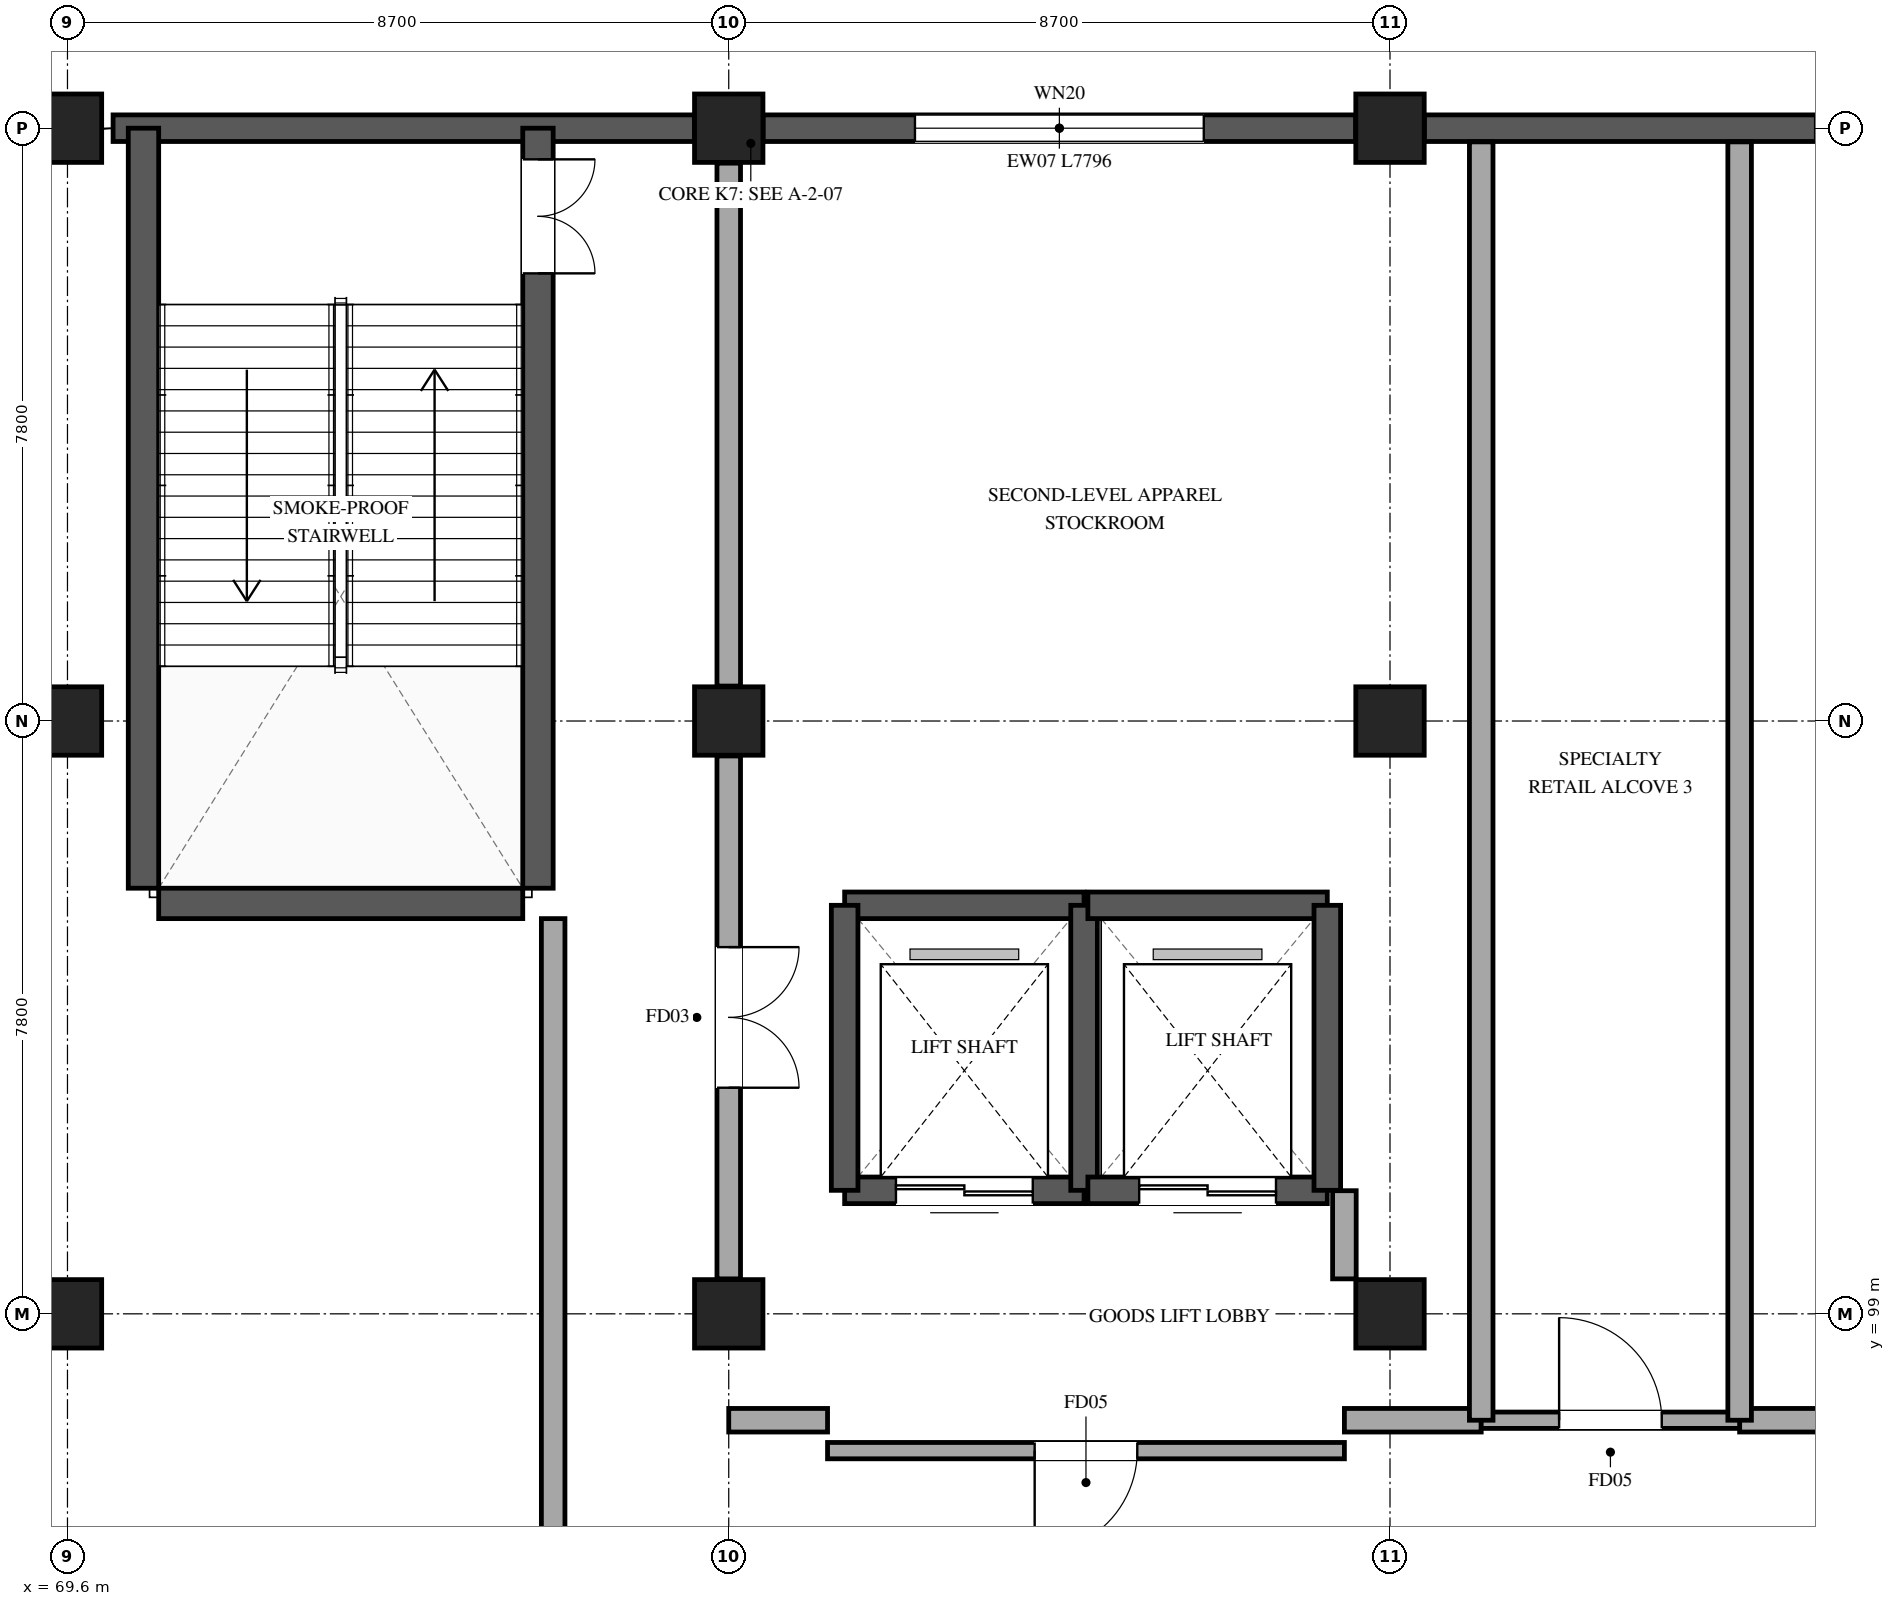
"""IFC4 building model, lengths in metres.
Left out: names, types, materials, properties, quantities, classifications, styles, units other than length and angle.
Written with IfcOpenShell. Run it as: python <this file> out.ifc"""

import sys

from ifc_helpers import new_model, si_unit, direction, frame, frame_2d, origin, origin_2d, place, context, subcontext, project, spatial, rectangle, extrude, element, fill, save


model = new_model("IFC4")
c1 = context("Model", 3, precision=1e-05, world=origin(), true_north=direction((0.0, 1.0)))
c2 = subcontext(c1, "Body", "Model", "MODEL_VIEW")
j1 = project(units=[si_unit("LENGTHUNIT", "METRE"), si_unit("PLANEANGLEUNIT", "RADIAN")], contexts=[c1])
p1 = place(None, origin())
s1 = spatial("IfcSite", under=j1, at=p1, CompositionType="ELEMENT")
p2 = place(p1, origin())
s2 = spatial("IfcBuilding", under=s1, at=p2, CompositionType="ELEMENT")
p3 = place(p2, frame((0.0, 0.0, 6.0)))
s3 = spatial("IfcBuildingStorey", under=s2, at=p3, CompositionType="ELEMENT", Elevation=6.0)
for number, where, z_axis, x_axis in (
    (1, (69.6, 99.0, 0.0), (0.0, 0.0, 1.0), (1.0, 0.0, 0.0)),
    (2, (69.6, 106.8, 0.0), (0.0, 0.0, 1.0), (1.0, 0.0, 0.0)),
    (3, (69.6, 114.6, 0.0), (0.0, 0.0, 1.0), (1.0, 0.0, 0.0)),
    (4, (78.3, 99.0, 0.0), (0.0, 0.0, 1.0), (1.0, 0.0, 0.0)),
    (5, (78.3, 106.8, 0.0), (0.0, 0.0, 1.0), (1.0, 0.0, 0.0)),
    (6, (78.3, 114.6, 0.0), (0.0, 0.0, 1.0), (1.0, 0.0, 0.0)),
    (7, (87.0, 99.0, 0.0), (0.0, 0.0, 1.0), (1.0, 0.0, 0.0)),
    (8, (87.0, 106.8, 0.0), (0.0, 0.0, 1.0), (1.0, 0.0, 0.0)),
    (9, (87.0, 114.6, 0.0), (0.0, 0.0, 1.0), (1.0, 0.0, 0.0)),
):
    element("IfcColumn", number, at=place(p3, frame(where, z_axis=z_axis, x_axis=x_axis)), inside=s3, PredefinedType="COLUMN", context=c2, shape_type="SweptSolid", body=[
        extrude(rectangle(XDim=0.9, YDim=0.9, at=origin_2d()), origin(), (0.0, 0.0, 1.0), 5.4),
    ])
p4 = place(p3, frame((70.2, 114.6, 0.0), z_axis=(0.0, 0.0, 1.0), x_axis=(1.0, 0.0, 0.0)))
e10 = element("IfcWall", 10, at=p4, inside=s3, PredefinedType="STANDARD", context=c2, shape_type="SweptSolid", body=[
    extrude(rectangle(XDim=7.648, YDim=0.35, at=frame_2d((3.824, 0.0))), origin(), (0.0, 0.0, 1.0), 5.09),
])
p5 = place(p3, frame((78.752, 114.6, 0.0), z_axis=(0.0, 0.0, 1.0), x_axis=(1.0, 0.0, 0.0)))
e11 = element("IfcWall", 11, at=p5, inside=s3, PredefinedType="STANDARD", context=c2, shape_type="SweptSolid", body=[
    extrude(rectangle(XDim=7.796, YDim=0.35, at=frame_2d((3.898, 0.0))), origin(), (0.0, 0.0, 1.0), 5.09),
])
p6 = place(p5, frame((1.998, 0.0, 0.85)))
e12 = element("IfcOpeningElement", 12, at=p6, cuts=e11, PredefinedType="OPENING", context=c2, shape_type="SweptSolid", body=[
    extrude(rectangle(XDim=3.8, YDim=2.5, at=frame_2d((1.9, 1.25))), frame((0.0, 0.185, 0.0), z_axis=(0.0, -1.0, 0.0), x_axis=(1.0, 0.0, 0.0)), (0.0, 0.0, 1.0), 0.37),
])
p7 = place(p3, frame((87.452, 114.6, 0.0), z_axis=(0.0, 0.0, 1.0), x_axis=(1.0, 0.0, 0.0)))
e13 = element("IfcWall", 13, at=p7, inside=s3, PredefinedType="STANDARD", context=c2, shape_type="SweptSolid", body=[
    extrude(rectangle(XDim=7.796, YDim=0.35, at=frame_2d((3.898, 0.0))), origin(), (0.0, 0.0, 1.0), 5.09),
])
p8 = place(p7, frame((5.141, 0.0, 0.85)))
e14 = element("IfcOpeningElement", 14, at=p8, cuts=e13, PredefinedType="OPENING", context=c2, shape_type="SweptSolid", body=[
    extrude(rectangle(XDim=2.0, YDim=1.85, at=frame_2d((1.0, 0.925))), frame((0.0, 0.185, 0.0), z_axis=(0.0, -1.0, 0.0), x_axis=(1.0, 0.0, 0.0)), (0.0, 0.0, 1.0), 0.37),
])
p9 = place(p3, frame((70.6, 104.6, 0.0), z_axis=(0.0, 0.0, 1.0), x_axis=(0.0, 1.0, 0.0)))
e15 = element("IfcWall", 15, at=p9, inside=s3, PredefinedType="SHEAR", context=c2, shape_type="SweptSolid", body=[
    extrude(rectangle(XDim=10.0, YDim=0.4, at=frame_2d((5.0, 0.0))), origin(), (0.0, 0.0, 1.0), 5.4),
])
p10 = place(p3, frame((75.79, 114.6, 0.0), z_axis=(0.0, 0.0, 1.0), x_axis=(0.0, -1.0, 0.0)))
e16 = element("IfcWall", 16, at=p10, inside=s3, PredefinedType="SHEAR", context=c2, shape_type="SweptSolid", body=[
    extrude(rectangle(XDim=10.0, YDim=0.4, at=frame_2d((5.0, 0.0))), origin(), (0.0, 0.0, 1.0), 5.4),
])
p11 = place(p10, frame((0.41, 0.0, 0.0)))
e17 = element("IfcOpeningElement", 17, at=p11, cuts=e16, PredefinedType="OPENING", context=c2, shape_type="SweptSolid", body=[
    extrude(rectangle(XDim=1.5, YDim=2.2, at=frame_2d((0.75, 1.1))), frame((0.0, 0.21, 0.0), z_axis=(0.0, -1.0, 0.0), x_axis=(1.0, 0.0, 0.0)), (0.0, 0.0, 1.0), 0.42),
])
p12 = place(p3, frame((75.59, 104.4, 0.0), z_axis=(0.0, 0.0, 1.0), x_axis=(-1.0, 0.0, 0.0)))
e18 = element("IfcWall", 18, at=p12, inside=s3, PredefinedType="SHEAR", context=c2, shape_type="SweptSolid", body=[
    extrude(rectangle(XDim=4.79, YDim=0.4, at=frame_2d((2.395, 0.0))), origin(), (0.0, 0.0, 1.0), 5.4),
])
p13 = place(p3, frame((79.825, 104.375, 0.0), z_axis=(0.0, 0.0, 1.0), x_axis=(1.0, 0.0, 0.0)))
e19 = element("IfcWall", 19, at=p13, inside=s3, PredefinedType="SHEAR", context=c2, shape_type="SweptSolid", body=[
    extrude(rectangle(XDim=3.15, YDim=0.35, at=frame_2d((1.575, 0.0))), origin(), (0.0, 0.0, 1.0), 5.4),
])
p14 = place(p3, frame((82.975, 100.625, 0.0), z_axis=(0.0, 0.0, 1.0), x_axis=(-1.0, 0.0, 0.0)))
e20 = element("IfcWall", 20, at=p14, inside=s3, PredefinedType="SHEAR", context=c2, shape_type="SweptSolid", body=[
    extrude(rectangle(XDim=3.15, YDim=0.35, at=frame_2d((1.575, 0.0))), origin(), (0.0, 0.0, 1.0), 5.4),
])
p15 = place(p14, frame((0.675, 0.0, 0.0)))
e21 = element("IfcOpeningElement", 21, at=p15, cuts=e20, PredefinedType="OPENING", context=c2, shape_type="SweptSolid", body=[
    extrude(rectangle(XDim=1.8, YDim=2.4, at=frame_2d((0.9, 1.2))), frame((0.0, 0.185, 0.0), z_axis=(0.0, -1.0, 0.0), x_axis=(1.0, 0.0, 0.0)), (0.0, 0.0, 1.0), 0.37),
])
for number, where, z_axis, x_axis in (
    (22, (79.825, 100.625, 0.0), (0.0, 0.0, 1.0), (0.0, 1.0, 0.0)),
    (23, (82.975, 104.375, 0.0), (0.0, 0.0, 1.0), (0.0, -1.0, 0.0)),
):
    element("IfcWall", number, at=place(p3, frame(where, z_axis=z_axis, x_axis=x_axis)), inside=s3, PredefinedType="SHEAR", context=c2, shape_type="SweptSolid", body=[
        extrude(rectangle(XDim=3.75, YDim=0.35, at=frame_2d((1.875, 0.0))), origin(), (0.0, 0.0, 1.0), 5.4),
    ])
p16 = place(p3, frame((83.025, 104.375, 0.0), z_axis=(0.0, 0.0, 1.0), x_axis=(1.0, 0.0, 0.0)))
e24 = element("IfcWall", 24, at=p16, inside=s3, PredefinedType="SHEAR", context=c2, shape_type="SweptSolid", body=[
    extrude(rectangle(XDim=3.15, YDim=0.35, at=frame_2d((1.575, 0.0))), origin(), (0.0, 0.0, 1.0), 5.4),
])
p17 = place(p3, frame((86.175, 100.625, 0.0), z_axis=(0.0, 0.0, 1.0), x_axis=(-1.0, 0.0, 0.0)))
e25 = element("IfcWall", 25, at=p17, inside=s3, PredefinedType="SHEAR", context=c2, shape_type="SweptSolid", body=[
    extrude(rectangle(XDim=3.15, YDim=0.35, at=frame_2d((1.575, 0.0))), origin(), (0.0, 0.0, 1.0), 5.4),
])
p18 = place(p17, frame((0.675, 0.0, 0.0)))
e26 = element("IfcOpeningElement", 26, at=p18, cuts=e25, PredefinedType="OPENING", context=c2, shape_type="SweptSolid", body=[
    extrude(rectangle(XDim=1.8, YDim=2.4, at=frame_2d((0.9, 1.2))), frame((0.0, 0.185, 0.0), z_axis=(0.0, -1.0, 0.0), x_axis=(1.0, 0.0, 0.0)), (0.0, 0.0, 1.0), 0.37),
])
p19 = place(p3, frame((86.175, 104.375, 0.0), z_axis=(0.0, 0.0, 1.0), x_axis=(0.0, -1.0, 0.0)))
e27 = element("IfcWall", 27, at=p19, inside=s3, PredefinedType="SHEAR", context=c2, shape_type="SweptSolid", body=[
    extrude(rectangle(XDim=3.75, YDim=0.35, at=frame_2d((1.875, 0.0))), origin(), (0.0, 0.0, 1.0), 5.4),
])
p20 = place(p3, frame((86.4, 97.2, 0.0), z_axis=(0.0, 0.0, 1.0), x_axis=(-1.0, 0.0, 0.0)))
e28 = element("IfcWall", 28, at=p20, inside=s3, PredefinedType="PARTITIONING", context=c2, shape_type="SweptSolid", body=[
    extrude(rectangle(XDim=6.8, YDim=0.215, at=frame_2d((3.4, 0.0))), origin(), (0.0, 0.0, 1.0), 5.06),
])
p21 = place(p20, frame((2.725, 0.0, 0.0)))
e29 = element("IfcOpeningElement", 29, at=p21, cuts=e28, PredefinedType="OPENING", context=c2, shape_type="SweptSolid", body=[
    extrude(rectangle(XDim=1.35, YDim=2.2, at=frame_2d((0.675, 1.1))), frame((0.0, 0.118, 0.0), z_axis=(0.0, -1.0, 0.0), x_axis=(1.0, 0.0, 0.0)), (0.0, 0.0, 1.0), 0.235),
])
p22 = place(p3, frame((86.4, 100.62, 0.0), z_axis=(0.0, 0.0, 1.0), x_axis=(0.0, -1.0, 0.0)))
e30 = element("IfcWall", 30, at=p22, inside=s3, PredefinedType="STANDARD", context=c2, shape_type="SweptSolid", body=[
    extrude(rectangle(XDim=1.16, YDim=0.31, at=frame_2d((0.58, 0.0))), origin(), (0.0, 0.0, 1.0), 5.06),
])
p23 = place(p3, frame((75.99, 94.8, 0.0), z_axis=(0.0, 0.0, 1.0), x_axis=(0.0, 1.0, 0.0)))
e31 = element("IfcWall", 31, at=p23, inside=s3, PredefinedType="STANDARD", context=c2, shape_type="SweptSolid", body=[
    extrude(rectangle(XDim=9.4, YDim=0.31, at=frame_2d((4.7, 0.0))), origin(), (0.0, 0.0, 1.0), 4.28),
])
p24 = place(p3, frame((78.3, 114.14, 0.0), z_axis=(0.0, 0.0, 1.0), x_axis=(0.0, -1.0, 0.0)))
e32 = element("IfcWall", 32, at=p24, inside=s3, PredefinedType="STANDARD", context=c2, shape_type="SweptSolid", body=[
    extrude(rectangle(XDim=6.88, YDim=0.31, at=frame_2d((3.44, 0.0))), origin(), (0.0, 0.0, 1.0), 4.28),
])
p25 = place(p3, frame((78.3, 106.34, 0.0), z_axis=(0.0, 0.0, 1.0), x_axis=(0.0, -1.0, 0.0)))
e33 = element("IfcWall", 33, at=p25, inside=s3, PredefinedType="STANDARD", context=c2, shape_type="SweptSolid", body=[
    extrude(rectangle(XDim=6.88, YDim=0.31, at=frame_2d((3.44, 0.0))), origin(), (0.0, 0.0, 1.0), 4.28),
])
p26 = place(p25, frame((2.515, 0.0, 0.0)))
e34 = element("IfcOpeningElement", 34, at=p26, cuts=e33, PredefinedType="OPENING", context=c2, shape_type="SweptSolid", body=[
    extrude(rectangle(XDim=1.85, YDim=2.3, at=frame_2d((0.925, 1.15))), frame((0.0, 0.165, 0.0), z_axis=(0.0, -1.0, 0.0), x_axis=(1.0, 0.0, 0.0)), (0.0, 0.0, 1.0), 0.33),
])
p27 = place(p3, frame((78.3, 97.6, 0.0), z_axis=(0.0, 0.0, 1.0), x_axis=(1.0, 0.0, 0.0)))
e35 = element("IfcWall", 35, at=p27, inside=s3, PredefinedType="STANDARD", context=c2, shape_type="SweptSolid", body=[
    extrude(rectangle(XDim=1.3, YDim=0.31, at=frame_2d((0.65, 0.0))), origin(), (0.0, 0.0, 1.0), 4.28),
])
p28 = place(p3, frame((86.4, 97.6, 0.0), z_axis=(0.0, 0.0, 1.0), x_axis=(1.0, 0.0, 0.0)))
e36 = element("IfcWall", 36, at=p28, inside=s3, PredefinedType="STANDARD", context=c2, shape_type="SweptSolid", body=[
    extrude(rectangle(XDim=1.8, YDim=0.31, at=frame_2d((0.9, 0.0))), origin(), (0.0, 0.0, 1.0), 4.28),
])
p29 = place(p3, frame((91.6, 97.6, 0.0), z_axis=(0.0, 0.0, 1.0), x_axis=(1.0, 0.0, 0.0)))
e37 = element("IfcWall", 37, at=p29, inside=s3, PredefinedType="STANDARD", context=c2, shape_type="SweptSolid", body=[
    extrude(rectangle(XDim=12.8, YDim=0.31, at=frame_2d((6.4, 0.0))), origin(), (0.0, 0.0, 1.0), 4.28),
])
p30 = place(p29, frame((5.475, 0.0, 0.0)))
e38 = element("IfcOpeningElement", 38, at=p30, cuts=e37, PredefinedType="OPENING", context=c2, shape_type="SweptSolid", body=[
    extrude(rectangle(XDim=1.85, YDim=2.3, at=frame_2d((0.925, 1.15))), frame((0.0, 0.165, 0.0), z_axis=(0.0, -1.0, 0.0), x_axis=(1.0, 0.0, 0.0)), (0.0, 0.0, 1.0), 0.33),
])
p31 = place(p3, frame((88.2, 97.6, 0.0), z_axis=(0.0, 0.0, 1.0), x_axis=(1.0, 0.0, 0.0)))
e39 = element("IfcWall", 39, at=p31, inside=s3, PredefinedType="PARTITIONING", context=c2, shape_type="SweptSolid", body=[
    extrude(rectangle(XDim=3.4, YDim=0.215, at=frame_2d((1.7, 0.0))), origin(), (0.0, 0.0, 1.0), 5.06),
])
p32 = place(p31, frame((1.025, 0.0, 0.0)))
e40 = element("IfcOpeningElement", 40, at=p32, cuts=e39, PredefinedType="OPENING", context=c2, shape_type="SweptSolid", body=[
    extrude(rectangle(XDim=1.35, YDim=2.2, at=frame_2d((0.675, 1.1))), frame((0.0, 0.118, 0.0), z_axis=(0.0, -1.0, 0.0), x_axis=(1.0, 0.0, 0.0)), (0.0, 0.0, 1.0), 0.235),
])
for number, where, z_axis, x_axis in (
    (41, (88.2, 114.42, 0.0), (0.0, 0.0, 1.0), (0.0, -1.0, 0.0)),
    (42, (91.6, 97.6, 0.0), (0.0, 0.0, 1.0), (0.0, 1.0, 0.0)),
):
    element("IfcWall", number, at=place(p3, frame(where, z_axis=z_axis, x_axis=x_axis)), inside=s3, PredefinedType="STANDARD", context=c2, shape_type="SweptSolid", body=[
        extrude(rectangle(XDim=16.82, YDim=0.31, at=frame_2d((8.41, 0.0))), origin(), (0.0, 0.0, 1.0), 4.28),
    ])
p33 = place(p6, origin())
e43 = element("IfcWindow", 43, at=p33, inside=s3, PartitioningType="TRIPLE_PANEL_VERTICAL", PredefinedType="WINDOW", context=c2, shape_type="SweptSolid", body=[
    extrude(rectangle(XDim=3.8, YDim=2.5, at=frame_2d((1.9, 1.25))), frame((0.0, 0.03, 0.0), z_axis=(0.0, -1.0, 0.0), x_axis=(1.0, 0.0, 0.0)), (0.0, 0.0, 1.0), 0.06),
])
fill(e12, e43)
p34 = place(p8, origin())
e44 = element("IfcWindow", 44, at=p34, inside=s3, PartitioningType="TRIPLE_PANEL_VERTICAL", PredefinedType="WINDOW", context=c2, shape_type="SweptSolid", body=[
    extrude(rectangle(XDim=2.0, YDim=1.85, at=frame_2d((1.0, 0.925))), frame((0.0, 0.03, 0.0), z_axis=(0.0, -1.0, 0.0), x_axis=(1.0, 0.0, 0.0)), (0.0, 0.0, 1.0), 0.06),
])
fill(e14, e44)
p35 = place(p11, origin())
e45 = element("IfcDoor", 45, at=p35, inside=s3, OperationType="DOUBLE_DOOR_SINGLE_SWING", PredefinedType="DOOR", context=c2, shape_type="SweptSolid", body=[
    extrude(rectangle(XDim=1.5, YDim=2.2, at=frame_2d((0.75, 1.1))), frame((0.0, 0.025, 0.0), z_axis=(0.0, -1.0, 0.0), x_axis=(1.0, 0.0, 0.0)), (0.0, 0.0, 1.0), 0.05),
])
fill(e17, e45)
p36 = place(p15, origin())
e46 = element("IfcDoor", 46, at=p36, inside=s3, OperationType="DOUBLE_DOOR_SLIDING", PredefinedType="DOOR", context=c2, shape_type="SweptSolid", body=[
    extrude(rectangle(XDim=1.8, YDim=2.4, at=frame_2d((0.9, 1.2))), frame((0.0, 0.025, 0.0), z_axis=(0.0, -1.0, 0.0), x_axis=(1.0, 0.0, 0.0)), (0.0, 0.0, 1.0), 0.05),
])
fill(e21, e46)
p37 = place(p18, origin())
e47 = element("IfcDoor", 47, at=p37, inside=s3, OperationType="DOUBLE_DOOR_SLIDING", PredefinedType="DOOR", context=c2, shape_type="SweptSolid", body=[
    extrude(rectangle(XDim=1.8, YDim=2.4, at=frame_2d((0.9, 1.2))), frame((0.0, 0.025, 0.0), z_axis=(0.0, -1.0, 0.0), x_axis=(1.0, 0.0, 0.0)), (0.0, 0.0, 1.0), 0.05),
])
fill(e26, e47)
p38 = place(p21, origin())
e48 = element("IfcDoor", 48, at=p38, inside=s3, OperationType="SINGLE_SWING_RIGHT", PredefinedType="DOOR", context=c2, shape_type="SweptSolid", body=[
    extrude(rectangle(XDim=1.35, YDim=2.2, at=frame_2d((0.675, 1.1))), frame((0.0, 0.025, 0.0), z_axis=(0.0, -1.0, 0.0), x_axis=(1.0, 0.0, 0.0)), (0.0, 0.0, 1.0), 0.05),
])
fill(e29, e48)
p39 = place(p26, origin())
e49 = element("IfcDoor", 49, at=p39, inside=s3, OperationType="DOUBLE_DOOR_SINGLE_SWING", PredefinedType="DOOR", context=c2, shape_type="SweptSolid", body=[
    extrude(rectangle(XDim=1.85, YDim=2.3, at=frame_2d((0.925, 1.15))), frame((0.0, 0.025, 0.0), z_axis=(0.0, -1.0, 0.0), x_axis=(1.0, 0.0, 0.0)), (0.0, 0.0, 1.0), 0.05),
])
fill(e34, e49)
p40 = place(p32, origin())
e50 = element("IfcDoor", 50, at=p40, inside=s3, OperationType="SINGLE_SWING_LEFT", PredefinedType="DOOR", context=c2, shape_type="SweptSolid", body=[
    extrude(rectangle(XDim=1.35, YDim=2.2, at=frame_2d((0.675, 1.1))), frame((0.0, 0.025, 0.0), z_axis=(0.0, -1.0, 0.0), x_axis=(1.0, 0.0, 0.0)), (0.0, 0.0, 1.0), 0.05),
])
fill(e40, e50)
save(model, sys.argv[1])
